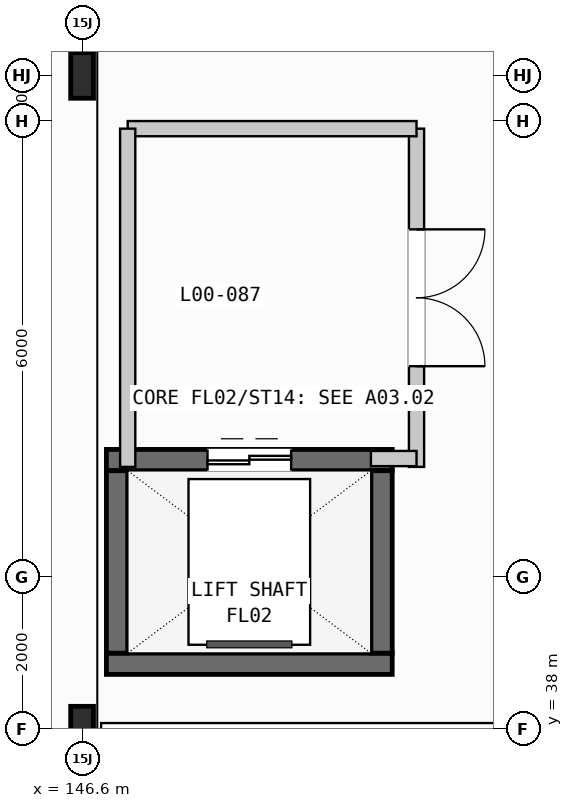
"""IFC4 building model, lengths in metres.
Left out: names, types, materials, properties, quantities, classifications, styles, units other than length and angle.
Written with IfcOpenShell. Run it as: python <this file> out.ifc"""

import sys

from ifc_helpers import new_model, si_unit, direction, frame, frame_2d, origin, origin_2d, place, context, subcontext, project, spatial, rectangle, i_section, extrude, element, fill, save


model = new_model("IFC4")
c1 = context("Model", 3, precision=1e-05, world=origin(), true_north=direction((0.0, 1.0)))
c2 = subcontext(c1, "Body", "Model", "MODEL_VIEW")
j1 = project(units=[si_unit("LENGTHUNIT", "METRE"), si_unit("PLANEANGLEUNIT", "RADIAN")], contexts=[c1])
p1 = place(None, origin())
s1 = spatial("IfcSite", under=j1, at=p1, CompositionType="ELEMENT")
p2 = place(p1, origin())
s2 = spatial("IfcBuilding", under=s1, at=p2, CompositionType="ELEMENT")
p3 = place(p2, origin())
s3 = spatial("IfcBuildingStorey", under=s2, at=p3, CompositionType="ELEMENT", Elevation=0.0)
for number, where, z_axis, x_axis in (
    (1, (146.6, 38.0, 0.0), (0.0, 0.0, 1.0), (1.0, 0.0, 0.0)),
    (2, (146.6, 46.6, 0.0), (0.0, 0.0, 1.0), (1.0, 0.0, 0.0)),
):
    element("IfcColumn", number, at=place(p3, frame(where, z_axis=z_axis, x_axis=x_axis)), inside=s3, PredefinedType="COLUMN", context=c2, shape_type="SweptSolid", body=[
        extrude(i_section(OverallWidth=0.3, OverallDepth=0.6, WebThickness=0.015, FlangeThickness=0.03, FilletRadius=0.027, at=origin_2d()), origin(), (0.0, 0.0, 1.0), 6.0),
    ])
p4 = place(p3, frame((146.92, 38.86, 0.0), z_axis=(0.0, 0.0, 1.0), x_axis=(1.0, 0.0, 0.0)))
e3 = element("IfcWall", 3, at=p4, inside=s3, PredefinedType="SHEAR", context=c2, shape_type="SweptSolid", body=[
    extrude(rectangle(XDim=3.76, YDim=0.28, at=frame_2d((1.88, 0.0))), origin(), (0.0, 0.0, 1.0), 6.0),
])
p5 = place(p3, frame((146.92, 41.54, 0.0), z_axis=(0.0, 0.0, 1.0), x_axis=(1.0, 0.0, 0.0)))
e4 = element("IfcWall", 4, at=p5, inside=s3, PredefinedType="SHEAR", context=c2, shape_type="SweptSolid", body=[
    extrude(rectangle(XDim=3.76, YDim=0.28, at=frame_2d((1.88, 0.0))), origin(), (0.0, 0.0, 1.0), 6.0),
])
p6 = place(p5, frame((1.33, 0.0, 0.0)))
e5 = element("IfcOpeningElement", 5, at=p6, cuts=e4, PredefinedType="OPENING", context=c2, shape_type="SweptSolid", body=[
    extrude(rectangle(XDim=1.1, YDim=2.15, at=frame_2d((0.55, 1.075))), frame((0.0, 0.15, 0.0), z_axis=(0.0, -1.0, 0.0), x_axis=(1.0, 0.0, 0.0)), (0.0, 0.0, 1.0), 0.3),
])
for number, where, z_axis, x_axis in (
    (6, (147.06, 39.0, 0.0), (0.0, 0.0, 1.0), (0.0, 1.0, 0.0)),
    (7, (150.54, 39.0, 0.0), (0.0, 0.0, 1.0), (0.0, 1.0, 0.0)),
):
    element("IfcWall", number, at=place(p3, frame(where, z_axis=z_axis, x_axis=x_axis)), inside=s3, PredefinedType="SHEAR", context=c2, shape_type="SweptSolid", body=[
        extrude(rectangle(XDim=2.4, YDim=0.28, at=frame_2d((1.2, 0.0))), origin(), (0.0, 0.0, 1.0), 6.0),
    ])
p7 = place(p3, frame((151.0, 41.45, 0.0), z_axis=(0.0, 0.0, 1.0), x_axis=(0.0, 1.0, 0.0)))
e8 = element("IfcWall", 8, at=p7, inside=s3, PredefinedType="PARTITIONING", context=c2, shape_type="SweptSolid", body=[
    extrude(rectangle(XDim=4.45, YDim=0.2, at=frame_2d((2.225, 0.0))), origin(), (0.0, 0.0, 1.0), 4.0),
])
p8 = place(p7, frame((1.325, 0.0, 0.0)))
e9 = element("IfcOpeningElement", 9, at=p8, cuts=e8, PredefinedType="OPENING", context=c2, shape_type="SweptSolid", body=[
    extrude(rectangle(XDim=1.8, YDim=2.2, at=frame_2d((0.9, 1.1))), frame((0.0, 0.11, 0.0), z_axis=(0.0, -1.0, 0.0), x_axis=(1.0, 0.0, 0.0)), (0.0, 0.0, 1.0), 0.22),
])
p9 = place(p3, frame((147.2, 45.9, 0.0), z_axis=(0.0, 0.0, 1.0), x_axis=(1.0, 0.0, 0.0)))
e10 = element("IfcWall", 10, at=p9, inside=s3, PredefinedType="PARTITIONING", context=c2, shape_type="SweptSolid", body=[
    extrude(rectangle(XDim=3.8, YDim=0.2, at=frame_2d((1.9, 0.0))), origin(), (0.0, 0.0, 1.0), 4.0),
])
p10 = place(p3, frame((147.2, 41.45, 0.0), z_axis=(0.0, 0.0, 1.0), x_axis=(0.0, 1.0, 0.0)))
e11 = element("IfcWall", 11, at=p10, inside=s3, PredefinedType="PARTITIONING", context=c2, shape_type="SweptSolid", body=[
    extrude(rectangle(XDim=4.45, YDim=0.2, at=frame_2d((2.225, 0.0))), origin(), (0.0, 0.0, 1.0), 4.0),
])
p11 = place(p3, frame((150.4, 41.56, 0.0), z_axis=(0.0, 0.0, 1.0), x_axis=(1.0, 0.0, 0.0)))
e12 = element("IfcWall", 12, at=p11, inside=s3, PredefinedType="PARTITIONING", context=c2, shape_type="SweptSolid", body=[
    extrude(rectangle(XDim=0.6, YDim=0.2, at=frame_2d((0.3, 0.0))), origin(), (0.0, 0.0, 1.0), 4.0),
])
p12 = place(p6, origin())
e13 = element("IfcDoor", 13, at=p12, inside=s3, OperationType="DOUBLE_DOOR_SLIDING", PredefinedType="DOOR", context=c2, shape_type="SweptSolid", body=[
    extrude(rectangle(XDim=1.1, YDim=2.15, at=frame_2d((0.55, 1.075))), frame((0.0, 0.025, 0.0), z_axis=(0.0, -1.0, 0.0), x_axis=(1.0, 0.0, 0.0)), (0.0, 0.0, 1.0), 0.05),
])
fill(e5, e13)
p13 = place(p8, frame((1.8, 0.0, 0.0), z_axis=(0.0, 0.0, 1.0), x_axis=(-1.0, 0.0, 0.0)))
e14 = element("IfcDoor", 14, at=p13, inside=s3, OperationType="DOUBLE_DOOR_SINGLE_SWING", PredefinedType="DOOR", context=c2, shape_type="SweptSolid", body=[
    extrude(rectangle(XDim=1.8, YDim=2.2, at=frame_2d((0.9, 1.1))), frame((0.0, 0.025, 0.0), z_axis=(0.0, -1.0, 0.0), x_axis=(1.0, 0.0, 0.0)), (0.0, 0.0, 1.0), 0.05),
])
fill(e9, e14)
save(model, sys.argv[1])
